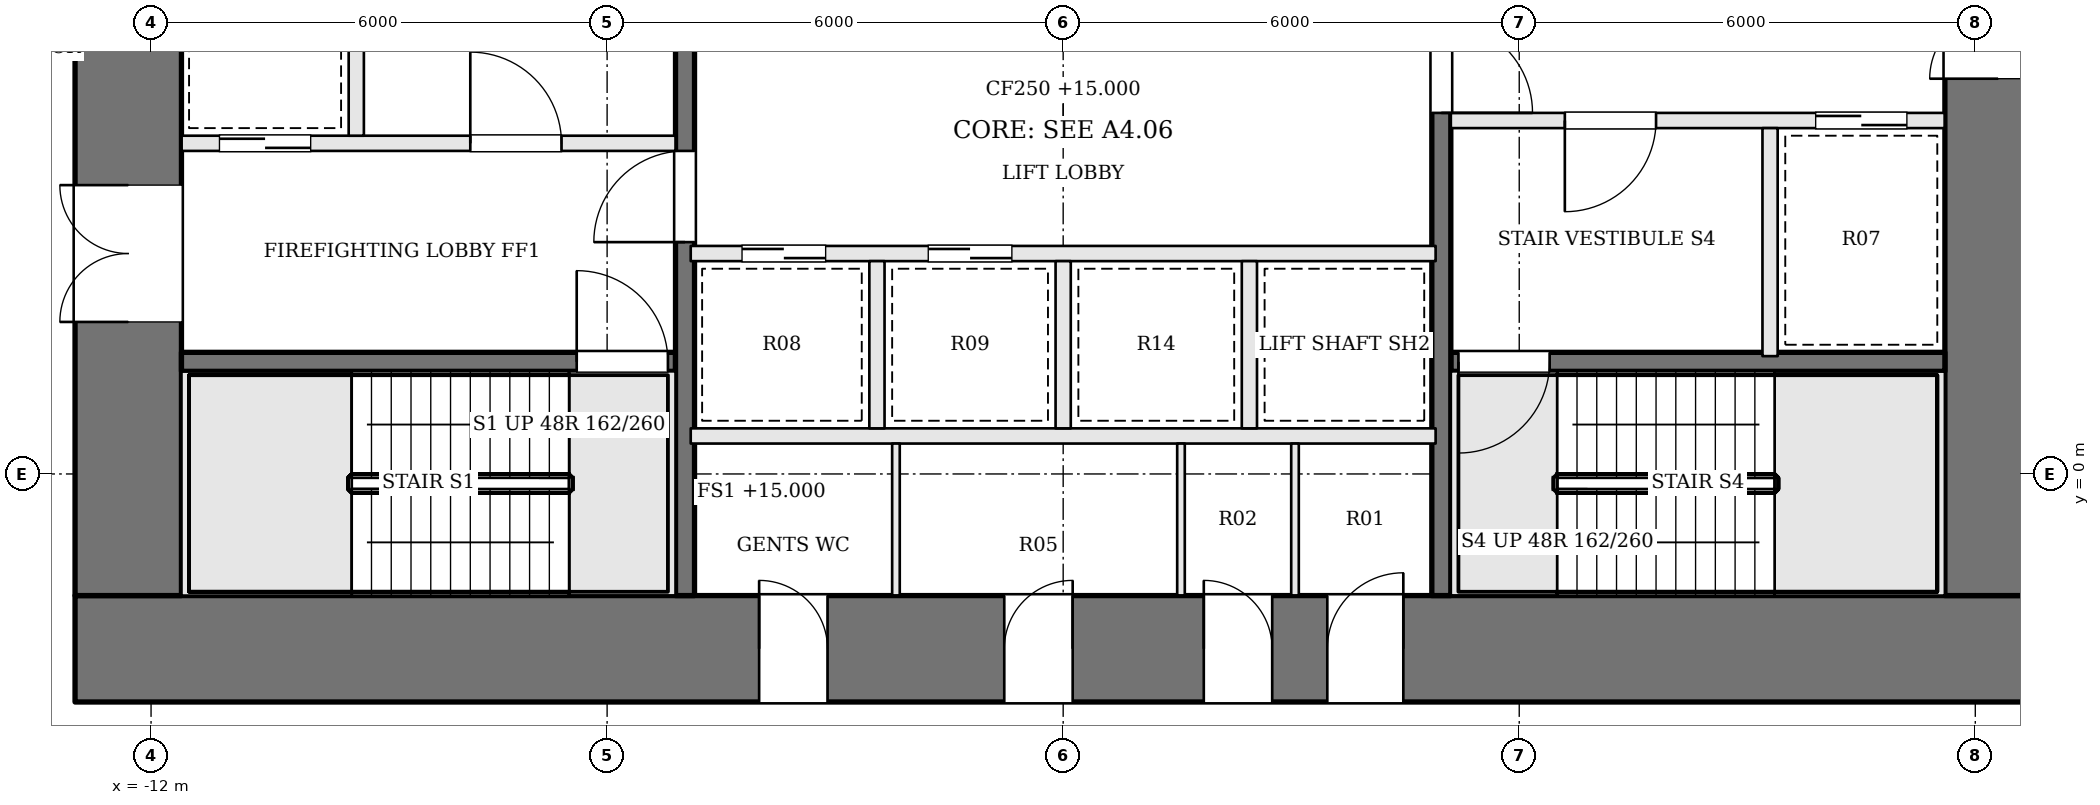
"""IFC4 building model, lengths in metres.
Left out: names, types, materials, properties, quantities, classifications, styles, units other than length and angle.
Written with IfcOpenShell. Run it as: python <this file> out.ifc"""

import sys

from ifc_helpers import new_model, si_unit, direction, frame, frame_2d, origin, place, context, subcontext, project, spatial, rectangle, extrude, element, fill, save


model = new_model("IFC4")
c1 = context("Model", 3, precision=1e-05, world=origin(), true_north=direction((0.0, 1.0)))
c2 = subcontext(c1, "Body", "Model", "MODEL_VIEW")
j1 = project(units=[si_unit("LENGTHUNIT", "METRE"), si_unit("PLANEANGLEUNIT", "RADIAN")], contexts=[c1])
p1 = place(None, origin())
s1 = spatial("IfcSite", under=j1, at=p1, CompositionType="ELEMENT")
p2 = place(p1, origin())
s2 = spatial("IfcBuilding", under=s1, at=p2, CompositionType="ELEMENT")
p3 = place(p2, frame((0.0, 0.0, 15.0)))
s3 = spatial("IfcBuildingStorey", under=s2, at=p3, CompositionType="ELEMENT", Elevation=15.0)
p4 = place(p3, frame((-13.0, -2.3, 0.0), z_axis=(0.0, 0.0, 1.0), x_axis=(1.0, 0.0, 0.0)))
e1 = element("IfcWall", 1, at=p4, inside=s3, PredefinedType="SHEAR", context=c2, shape_type="SweptSolid", body=[
    extrude(rectangle(XDim=26.0, YDim=1.4, at=frame_2d((13.0, 0.0))), origin(), (0.0, 0.0, 1.0), 7.8),
])
p5 = place(p4, frame((9.0, 0.0, 0.0)))
e2 = element("IfcOpeningElement", 2, at=p5, cuts=e1, PredefinedType="OPENING", context=c2, shape_type="SweptSolid", body=[
    extrude(rectangle(XDim=0.9, YDim=2.1, at=frame_2d((0.45, 1.05))), frame((0.0, 0.71, 0.0), z_axis=(0.0, -1.0, 0.0), x_axis=(1.0, 0.0, 0.0)), (0.0, 0.0, 1.0), 1.42),
])
p6 = place(p4, frame((12.225, 0.0, 0.0)))
e3 = element("IfcOpeningElement", 3, at=p6, cuts=e1, PredefinedType="OPENING", context=c2, shape_type="SweptSolid", body=[
    extrude(rectangle(XDim=0.9, YDim=2.1, at=frame_2d((0.45, 1.05))), frame((0.0, 0.71, 0.0), z_axis=(0.0, -1.0, 0.0), x_axis=(1.0, 0.0, 0.0)), (0.0, 0.0, 1.0), 1.42),
])
p7 = place(p4, frame((14.85, 0.0, 0.0)))
e4 = element("IfcOpeningElement", 4, at=p7, cuts=e1, PredefinedType="OPENING", context=c2, shape_type="SweptSolid", body=[
    extrude(rectangle(XDim=0.9, YDim=2.1, at=frame_2d((0.45, 1.05))), frame((0.0, 0.71, 0.0), z_axis=(0.0, -1.0, 0.0), x_axis=(1.0, 0.0, 0.0)), (0.0, 0.0, 1.0), 1.42),
])
p8 = place(p4, frame((16.475, 0.0, 0.0)))
e5 = element("IfcOpeningElement", 5, at=p8, cuts=e1, PredefinedType="OPENING", context=c2, shape_type="SweptSolid", body=[
    extrude(rectangle(XDim=1.0, YDim=2.1, at=frame_2d((0.5, 1.05))), frame((0.0, 0.71, 0.0), z_axis=(0.0, -1.0, 0.0), x_axis=(1.0, 0.0, 0.0)), (0.0, 0.0, 1.0), 1.42),
])
p9 = place(p3, frame((12.3, -1.6, 0.0), z_axis=(0.0, 0.0, 1.0), x_axis=(0.0, 1.0, 0.0)))
e6 = element("IfcWall", 6, at=p9, inside=s3, PredefinedType="SHEAR", context=c2, shape_type="SweptSolid", body=[
    extrude(rectangle(XDim=12.2, YDim=1.4, at=frame_2d((6.1, 0.0))), origin(), (0.0, 0.0, 1.0), 7.8),
])
p10 = place(p9, frame((6.8, 0.0, 0.0)))
e7 = element("IfcOpeningElement", 7, at=p10, cuts=e6, PredefinedType="OPENING", context=c2, shape_type="SweptSolid", body=[
    extrude(rectangle(XDim=1.8, YDim=2.1, at=frame_2d((0.9, 1.05))), frame((0.0, 0.71, 0.0), z_axis=(0.0, -1.0, 0.0), x_axis=(1.0, 0.0, 0.0)), (0.0, 0.0, 1.0), 1.42),
])
p11 = place(p3, frame((-12.3, -1.6, 0.0), z_axis=(0.0, 0.0, 1.0), x_axis=(0.0, 1.0, 0.0)))
e8 = element("IfcWall", 8, at=p11, inside=s3, PredefinedType="SHEAR", context=c2, shape_type="SweptSolid", body=[
    extrude(rectangle(XDim=12.2, YDim=1.4, at=frame_2d((6.1, 0.0))), origin(), (0.0, 0.0, 1.0), 7.8),
])
p12 = place(p11, frame((3.6, 0.0, 0.0)))
e9 = element("IfcOpeningElement", 9, at=p12, cuts=e8, PredefinedType="OPENING", context=c2, shape_type="SweptSolid", body=[
    extrude(rectangle(XDim=1.8, YDim=2.1, at=frame_2d((0.9, 1.05))), frame((0.0, 0.71, 0.0), z_axis=(0.0, -1.0, 0.0), x_axis=(1.0, 0.0, 0.0)), (0.0, 0.0, 1.0), 1.42),
])
p13 = place(p3, frame((-11.6, 1.475, 0.0), z_axis=(0.0, 0.0, 1.0), x_axis=(1.0, 0.0, 0.0)))
e10 = element("IfcWall", 10, at=p13, inside=s3, PredefinedType="SOLIDWALL", context=c2, shape_type="SweptSolid", body=[
    extrude(rectangle(XDim=6.5, YDim=0.25, at=frame_2d((3.25, 0.0))), origin(), (0.0, 0.0, 1.0), 7.55),
])
p14 = place(p13, frame((5.2, 0.0, 0.0)))
e11 = element("IfcOpeningElement", 11, at=p14, cuts=e10, PredefinedType="OPENING", context=c2, shape_type="SweptSolid", body=[
    extrude(rectangle(XDim=1.2, YDim=2.1, at=frame_2d((0.6, 1.05))), frame((0.0, 0.135, 0.0), z_axis=(0.0, -1.0, 0.0), x_axis=(1.0, 0.0, 0.0)), (0.0, 0.0, 1.0), 0.27),
])
p15 = place(p3, frame((-11.6, 4.35, 0.0), z_axis=(0.0, 0.0, 1.0), x_axis=(1.0, 0.0, 0.0)))
e12 = element("IfcWall", 12, at=p15, inside=s3, PredefinedType="SOLIDWALL", context=c2, shape_type="SweptSolid", body=[
    extrude(rectangle(XDim=6.5, YDim=0.2, at=frame_2d((3.25, 0.0))), origin(), (0.0, 0.0, 1.0), 7.55),
])
p16 = place(p15, frame((3.8, 0.0, 0.0)))
e13 = element("IfcOpeningElement", 13, at=p16, cuts=e12, PredefinedType="OPENING", context=c2, shape_type="SweptSolid", body=[
    extrude(rectangle(XDim=1.2, YDim=2.1, at=frame_2d((0.6, 1.05))), frame((0.0, 0.11, 0.0), z_axis=(0.0, -1.0, 0.0), x_axis=(1.0, 0.0, 0.0)), (0.0, 0.0, 1.0), 0.22),
])
p17 = place(p15, frame((0.5, 0.0, 0.0)))
e14 = element("IfcOpeningElement", 14, at=p17, cuts=e12, PredefinedType="OPENING", context=c2, shape_type="SweptSolid", body=[
    extrude(rectangle(XDim=1.2, YDim=2.1, at=frame_2d((0.6, 1.05))), frame((0.0, 0.11, 0.0), z_axis=(0.0, -1.0, 0.0), x_axis=(1.0, 0.0, 0.0)), (0.0, 0.0, 1.0), 0.22),
])
p18 = place(p3, frame((11.6, 4.65, 0.0), z_axis=(0.0, 0.0, 1.0), x_axis=(-1.0, 0.0, 0.0)))
e15 = element("IfcWall", 15, at=p18, inside=s3, PredefinedType="SOLIDWALL", context=c2, shape_type="SweptSolid", body=[
    extrude(rectangle(XDim=6.5, YDim=0.2, at=frame_2d((3.25, 0.0))), origin(), (0.0, 0.0, 1.0), 7.55),
])
p19 = place(p18, frame((3.8, 0.0, 0.0)))
e16 = element("IfcOpeningElement", 16, at=p19, cuts=e15, PredefinedType="OPENING", context=c2, shape_type="SweptSolid", body=[
    extrude(rectangle(XDim=1.2, YDim=2.1, at=frame_2d((0.6, 1.05))), frame((0.0, 0.11, 0.0), z_axis=(0.0, -1.0, 0.0), x_axis=(1.0, 0.0, 0.0)), (0.0, 0.0, 1.0), 0.22),
])
p20 = place(p18, frame((0.5, 0.0, 0.0)))
e17 = element("IfcOpeningElement", 17, at=p20, cuts=e15, PredefinedType="OPENING", context=c2, shape_type="SweptSolid", body=[
    extrude(rectangle(XDim=1.2, YDim=2.1, at=frame_2d((0.6, 1.05))), frame((0.0, 0.11, 0.0), z_axis=(0.0, -1.0, 0.0), x_axis=(1.0, 0.0, 0.0)), (0.0, 0.0, 1.0), 0.22),
])
p21 = place(p3, frame((11.6, 1.475, 0.0), z_axis=(0.0, 0.0, 1.0), x_axis=(-1.0, 0.0, 0.0)))
e18 = element("IfcWall", 18, at=p21, inside=s3, PredefinedType="SOLIDWALL", context=c2, shape_type="SweptSolid", body=[
    extrude(rectangle(XDim=6.5, YDim=0.25, at=frame_2d((3.25, 0.0))), origin(), (0.0, 0.0, 1.0), 7.55),
])
p22 = place(p21, frame((5.2, 0.0, 0.0)))
e19 = element("IfcOpeningElement", 19, at=p22, cuts=e18, PredefinedType="OPENING", context=c2, shape_type="SweptSolid", body=[
    extrude(rectangle(XDim=1.2, YDim=2.1, at=frame_2d((0.6, 1.05))), frame((0.0, 0.135, 0.0), z_axis=(0.0, -1.0, 0.0), x_axis=(1.0, 0.0, 0.0)), (0.0, 0.0, 1.0), 0.27),
])
for number, where, z_axis, x_axis in (
    (20, (-9.3, 4.45, 0.0), (0.0, 0.0, 1.0), (0.0, 1.0, 0.0)),
    (21, (9.3, 4.55, 0.0), (0.0, 0.0, 1.0), (0.0, -1.0, 0.0)),
):
    element("IfcWall", number, at=place(p3, frame(where, z_axis=z_axis, x_axis=x_axis)), inside=s3, PredefinedType="SOLIDWALL", context=c2, shape_type="SweptSolid", body=[
        extrude(rectangle(XDim=3.0, YDim=0.2, at=frame_2d((1.5, 0.0))), origin(), (0.0, 0.0, 1.0), 7.55),
    ])
p23 = place(p3, frame((-4.975, -1.6, 0.0), z_axis=(0.0, 0.0, 1.0), x_axis=(0.0, 1.0, 0.0)))
e22 = element("IfcWall", 22, at=p23, inside=s3, PredefinedType="SOLIDWALL", context=c2, shape_type="SweptSolid", body=[
    extrude(rectangle(XDim=12.2, YDim=0.25, at=frame_2d((6.1, 0.0))), origin(), (0.0, 0.0, 1.0), 7.55),
])
p24 = place(p23, frame((4.65, 0.0, 0.0)))
e23 = element("IfcOpeningElement", 23, at=p24, cuts=e22, PredefinedType="OPENING", context=c2, shape_type="SweptSolid", body=[
    extrude(rectangle(XDim=1.2, YDim=2.1, at=frame_2d((0.6, 1.05))), frame((0.0, 0.135, 0.0), z_axis=(0.0, -1.0, 0.0), x_axis=(1.0, 0.0, 0.0)), (0.0, 0.0, 1.0), 0.27),
])
p25 = place(p3, frame((4.975, 10.6, 0.0), z_axis=(0.0, 0.0, 1.0), x_axis=(0.0, -1.0, 0.0)))
e24 = element("IfcWall", 24, at=p25, inside=s3, PredefinedType="SOLIDWALL", context=c2, shape_type="SweptSolid", body=[
    extrude(rectangle(XDim=12.2, YDim=0.25, at=frame_2d((6.1, 0.0))), origin(), (0.0, 0.0, 1.0), 7.55),
])
p26 = place(p25, frame((4.65, 0.0, 0.0)))
e25 = element("IfcOpeningElement", 25, at=p26, cuts=e24, PredefinedType="OPENING", context=c2, shape_type="SweptSolid", body=[
    extrude(rectangle(XDim=1.2, YDim=2.1, at=frame_2d((0.6, 1.05))), frame((0.0, 0.135, 0.0), z_axis=(0.0, -1.0, 0.0), x_axis=(1.0, 0.0, 0.0)), (0.0, 0.0, 1.0), 0.27),
])
p27 = place(p3, frame((-4.9, 0.5, 0.0), z_axis=(0.0, 0.0, 1.0), x_axis=(1.0, 0.0, 0.0)))
e26 = element("IfcWall", 26, at=p27, inside=s3, PredefinedType="SOLIDWALL", context=c2, shape_type="SweptSolid", body=[
    extrude(rectangle(XDim=9.8, YDim=0.2, at=frame_2d((4.9, 0.0))), origin(), (0.0, 0.0, 1.0), 7.55),
])
p28 = place(p3, frame((-4.9, 2.9, 0.0), z_axis=(0.0, 0.0, 1.0), x_axis=(1.0, 0.0, 0.0)))
e27 = element("IfcWall", 27, at=p28, inside=s3, PredefinedType="SOLIDWALL", context=c2, shape_type="SweptSolid", body=[
    extrude(rectangle(XDim=9.8, YDim=0.2, at=frame_2d((4.9, 0.0))), origin(), (0.0, 0.0, 1.0), 7.55),
])
p29 = place(p28, frame((0.675, 0.0, 0.0)))
e28 = element("IfcOpeningElement", 28, at=p29, cuts=e27, PredefinedType="OPENING", context=c2, shape_type="SweptSolid", body=[
    extrude(rectangle(XDim=1.1, YDim=2.1, at=frame_2d((0.55, 1.05))), frame((0.0, 0.11, 0.0), z_axis=(0.0, -1.0, 0.0), x_axis=(1.0, 0.0, 0.0)), (0.0, 0.0, 1.0), 0.22),
])
p30 = place(p28, frame((3.125, 0.0, 0.0)))
e29 = element("IfcOpeningElement", 29, at=p30, cuts=e27, PredefinedType="OPENING", context=c2, shape_type="SweptSolid", body=[
    extrude(rectangle(XDim=1.1, YDim=2.1, at=frame_2d((0.55, 1.05))), frame((0.0, 0.11, 0.0), z_axis=(0.0, -1.0, 0.0), x_axis=(1.0, 0.0, 0.0)), (0.0, 0.0, 1.0), 0.22),
])
for number, where, z_axis, x_axis in (
    (30, (-2.45, 0.6, 0.0), (0.0, 0.0, 1.0), (0.0, 1.0, 0.0)),
    (31, (0.0, 0.6, 0.0), (0.0, 0.0, 1.0), (0.0, 1.0, 0.0)),
    (32, (2.45, 0.6, 0.0), (0.0, 0.0, 1.0), (0.0, 1.0, 0.0)),
):
    element("IfcWall", number, at=place(p3, frame(where, z_axis=z_axis, x_axis=x_axis)), inside=s3, PredefinedType="SOLIDWALL", context=c2, shape_type="SweptSolid", body=[
        extrude(rectangle(XDim=2.2, YDim=0.2, at=frame_2d((1.1, 0.0))), origin(), (0.0, 0.0, 1.0), 7.55),
    ])
for number, where, z_axis, x_axis in (
    (33, (-2.2, -1.6, 0.0), (0.0, 0.0, 1.0), (0.0, 1.0, 0.0)),
    (34, (1.55, -1.6, 0.0), (0.0, 0.0, 1.0), (0.0, 1.0, 0.0)),
    (35, (3.05, -1.6, 0.0), (0.0, 0.0, 1.0), (0.0, 1.0, 0.0)),
):
    element("IfcWall", number, at=place(p3, frame(where, z_axis=z_axis, x_axis=x_axis)), inside=s3, PredefinedType="PARTITIONING", context=c2, shape_type="SweptSolid", body=[
        extrude(rectangle(XDim=2.0, YDim=0.1, at=frame_2d((1.0, 0.0))), origin(), (0.0, 0.0, 1.0), 7.55),
    ])
p31 = place(p12, origin())
e36 = element("IfcDoor", 36, at=p31, inside=s3, OperationType="DOUBLE_DOOR_SINGLE_SWING", PredefinedType="DOOR", context=c2, shape_type="SweptSolid", body=[
    extrude(rectangle(XDim=1.8, YDim=2.1, at=frame_2d((0.9, 1.05))), frame((0.0, 0.025, 0.0), z_axis=(0.0, -1.0, 0.0), x_axis=(1.0, 0.0, 0.0)), (0.0, 0.0, 1.0), 0.05),
])
fill(e9, e36)
p32 = place(p10, origin())
e37 = element("IfcDoor", 37, at=p32, inside=s3, OperationType="DOUBLE_DOOR_SINGLE_SWING", PredefinedType="DOOR", context=c2, shape_type="SweptSolid", body=[
    extrude(rectangle(XDim=1.8, YDim=2.1, at=frame_2d((0.9, 1.05))), frame((0.0, 0.025, 0.0), z_axis=(0.0, -1.0, 0.0), x_axis=(1.0, 0.0, 0.0)), (0.0, 0.0, 1.0), 0.05),
])
fill(e7, e37)
p33 = place(p24, origin())
e38 = element("IfcDoor", 38, at=p33, inside=s3, OperationType="SINGLE_SWING_LEFT", PredefinedType="DOOR", context=c2, shape_type="SweptSolid", body=[
    extrude(rectangle(XDim=1.2, YDim=2.1, at=frame_2d((0.6, 1.05))), frame((0.0, 0.025, 0.0), z_axis=(0.0, -1.0, 0.0), x_axis=(1.0, 0.0, 0.0)), (0.0, 0.0, 1.0), 0.05),
])
fill(e23, e38)
p34 = place(p26, origin())
e39 = element("IfcDoor", 39, at=p34, inside=s3, OperationType="SINGLE_SWING_RIGHT", PredefinedType="DOOR", context=c2, shape_type="SweptSolid", body=[
    extrude(rectangle(XDim=1.2, YDim=2.1, at=frame_2d((0.6, 1.05))), frame((0.0, 0.025, 0.0), z_axis=(0.0, -1.0, 0.0), x_axis=(1.0, 0.0, 0.0)), (0.0, 0.0, 1.0), 0.05),
])
fill(e25, e39)
p35 = place(p16, origin())
e40 = element("IfcDoor", 40, at=p35, inside=s3, OperationType="SINGLE_SWING_LEFT", PredefinedType="DOOR", context=c2, shape_type="SweptSolid", body=[
    extrude(rectangle(XDim=1.2, YDim=2.1, at=frame_2d((0.6, 1.05))), frame((0.0, 0.025, 0.0), z_axis=(0.0, -1.0, 0.0), x_axis=(1.0, 0.0, 0.0)), (0.0, 0.0, 1.0), 0.05),
])
fill(e13, e40)
p36 = place(p19, origin())
e41 = element("IfcDoor", 41, at=p36, inside=s3, OperationType="SINGLE_SWING_RIGHT", PredefinedType="DOOR", context=c2, shape_type="SweptSolid", body=[
    extrude(rectangle(XDim=1.2, YDim=2.1, at=frame_2d((0.6, 1.05))), frame((0.0, 0.025, 0.0), z_axis=(0.0, -1.0, 0.0), x_axis=(1.0, 0.0, 0.0)), (0.0, 0.0, 1.0), 0.05),
])
fill(e16, e41)
p37 = place(p14, origin())
e42 = element("IfcDoor", 42, at=p37, inside=s3, OperationType="SINGLE_SWING_LEFT", PredefinedType="DOOR", context=c2, shape_type="SweptSolid", body=[
    extrude(rectangle(XDim=1.2, YDim=2.1, at=frame_2d((0.6, 1.05))), frame((0.0, 0.025, 0.0), z_axis=(0.0, -1.0, 0.0), x_axis=(1.0, 0.0, 0.0)), (0.0, 0.0, 1.0), 0.05),
])
fill(e11, e42)
p38 = place(p22, origin())
e43 = element("IfcDoor", 43, at=p38, inside=s3, OperationType="SINGLE_SWING_RIGHT", PredefinedType="DOOR", context=c2, shape_type="SweptSolid", body=[
    extrude(rectangle(XDim=1.2, YDim=2.1, at=frame_2d((0.6, 1.05))), frame((0.0, 0.025, 0.0), z_axis=(0.0, -1.0, 0.0), x_axis=(1.0, 0.0, 0.0)), (0.0, 0.0, 1.0), 0.05),
])
fill(e19, e43)
p39 = place(p17, origin())
e44 = element("IfcDoor", 44, at=p39, inside=s3, OperationType="SLIDING_TO_RIGHT", PredefinedType="DOOR", context=c2, shape_type="SweptSolid", body=[
    extrude(rectangle(XDim=1.2, YDim=2.1, at=frame_2d((0.6, 1.05))), frame((0.0, 0.025, 0.0), z_axis=(0.0, -1.0, 0.0), x_axis=(1.0, 0.0, 0.0)), (0.0, 0.0, 1.0), 0.05),
])
fill(e14, e44)
p40 = place(p20, origin())
e45 = element("IfcDoor", 45, at=p40, inside=s3, OperationType="SLIDING_TO_RIGHT", PredefinedType="DOOR", context=c2, shape_type="SweptSolid", body=[
    extrude(rectangle(XDim=1.2, YDim=2.1, at=frame_2d((0.6, 1.05))), frame((0.0, 0.025, 0.0), z_axis=(0.0, -1.0, 0.0), x_axis=(1.0, 0.0, 0.0)), (0.0, 0.0, 1.0), 0.05),
])
fill(e17, e45)
p41 = place(p29, origin())
e46 = element("IfcDoor", 46, at=p41, inside=s3, OperationType="SLIDING_TO_RIGHT", PredefinedType="DOOR", context=c2, shape_type="SweptSolid", body=[
    extrude(rectangle(XDim=1.1, YDim=2.1, at=frame_2d((0.55, 1.05))), frame((0.0, 0.025, 0.0), z_axis=(0.0, -1.0, 0.0), x_axis=(1.0, 0.0, 0.0)), (0.0, 0.0, 1.0), 0.05),
])
fill(e28, e46)
p42 = place(p30, origin())
e47 = element("IfcDoor", 47, at=p42, inside=s3, OperationType="SLIDING_TO_LEFT", PredefinedType="DOOR", context=c2, shape_type="SweptSolid", body=[
    extrude(rectangle(XDim=1.1, YDim=2.1, at=frame_2d((0.55, 1.05))), frame((0.0, 0.025, 0.0), z_axis=(0.0, -1.0, 0.0), x_axis=(1.0, 0.0, 0.0)), (0.0, 0.0, 1.0), 0.05),
])
fill(e29, e47)
p43 = place(p5, origin())
e48 = element("IfcDoor", 48, at=p43, inside=s3, OperationType="SINGLE_SWING_LEFT", PredefinedType="DOOR", context=c2, shape_type="SweptSolid", body=[
    extrude(rectangle(XDim=0.9, YDim=2.1, at=frame_2d((0.45, 1.05))), frame((0.0, 0.025, 0.0), z_axis=(0.0, -1.0, 0.0), x_axis=(1.0, 0.0, 0.0)), (0.0, 0.0, 1.0), 0.05),
])
fill(e2, e48)
p44 = place(p6, origin())
e49 = element("IfcDoor", 49, at=p44, inside=s3, OperationType="SINGLE_SWING_RIGHT", PredefinedType="DOOR", context=c2, shape_type="SweptSolid", body=[
    extrude(rectangle(XDim=0.9, YDim=2.1, at=frame_2d((0.45, 1.05))), frame((0.0, 0.025, 0.0), z_axis=(0.0, -1.0, 0.0), x_axis=(1.0, 0.0, 0.0)), (0.0, 0.0, 1.0), 0.05),
])
fill(e3, e49)
p45 = place(p7, origin())
e50 = element("IfcDoor", 50, at=p45, inside=s3, OperationType="SINGLE_SWING_LEFT", PredefinedType="DOOR", context=c2, shape_type="SweptSolid", body=[
    extrude(rectangle(XDim=0.9, YDim=2.1, at=frame_2d((0.45, 1.05))), frame((0.0, 0.025, 0.0), z_axis=(0.0, -1.0, 0.0), x_axis=(1.0, 0.0, 0.0)), (0.0, 0.0, 1.0), 0.05),
])
fill(e4, e50)
p46 = place(p8, origin())
e51 = element("IfcDoor", 51, at=p46, inside=s3, OperationType="SINGLE_SWING_RIGHT", PredefinedType="DOOR", context=c2, shape_type="SweptSolid", body=[
    extrude(rectangle(XDim=1.0, YDim=2.1, at=frame_2d((0.5, 1.05))), frame((0.0, 0.025, 0.0), z_axis=(0.0, -1.0, 0.0), x_axis=(1.0, 0.0, 0.0)), (0.0, 0.0, 1.0), 0.05),
])
fill(e5, e51)
save(model, sys.argv[1])
